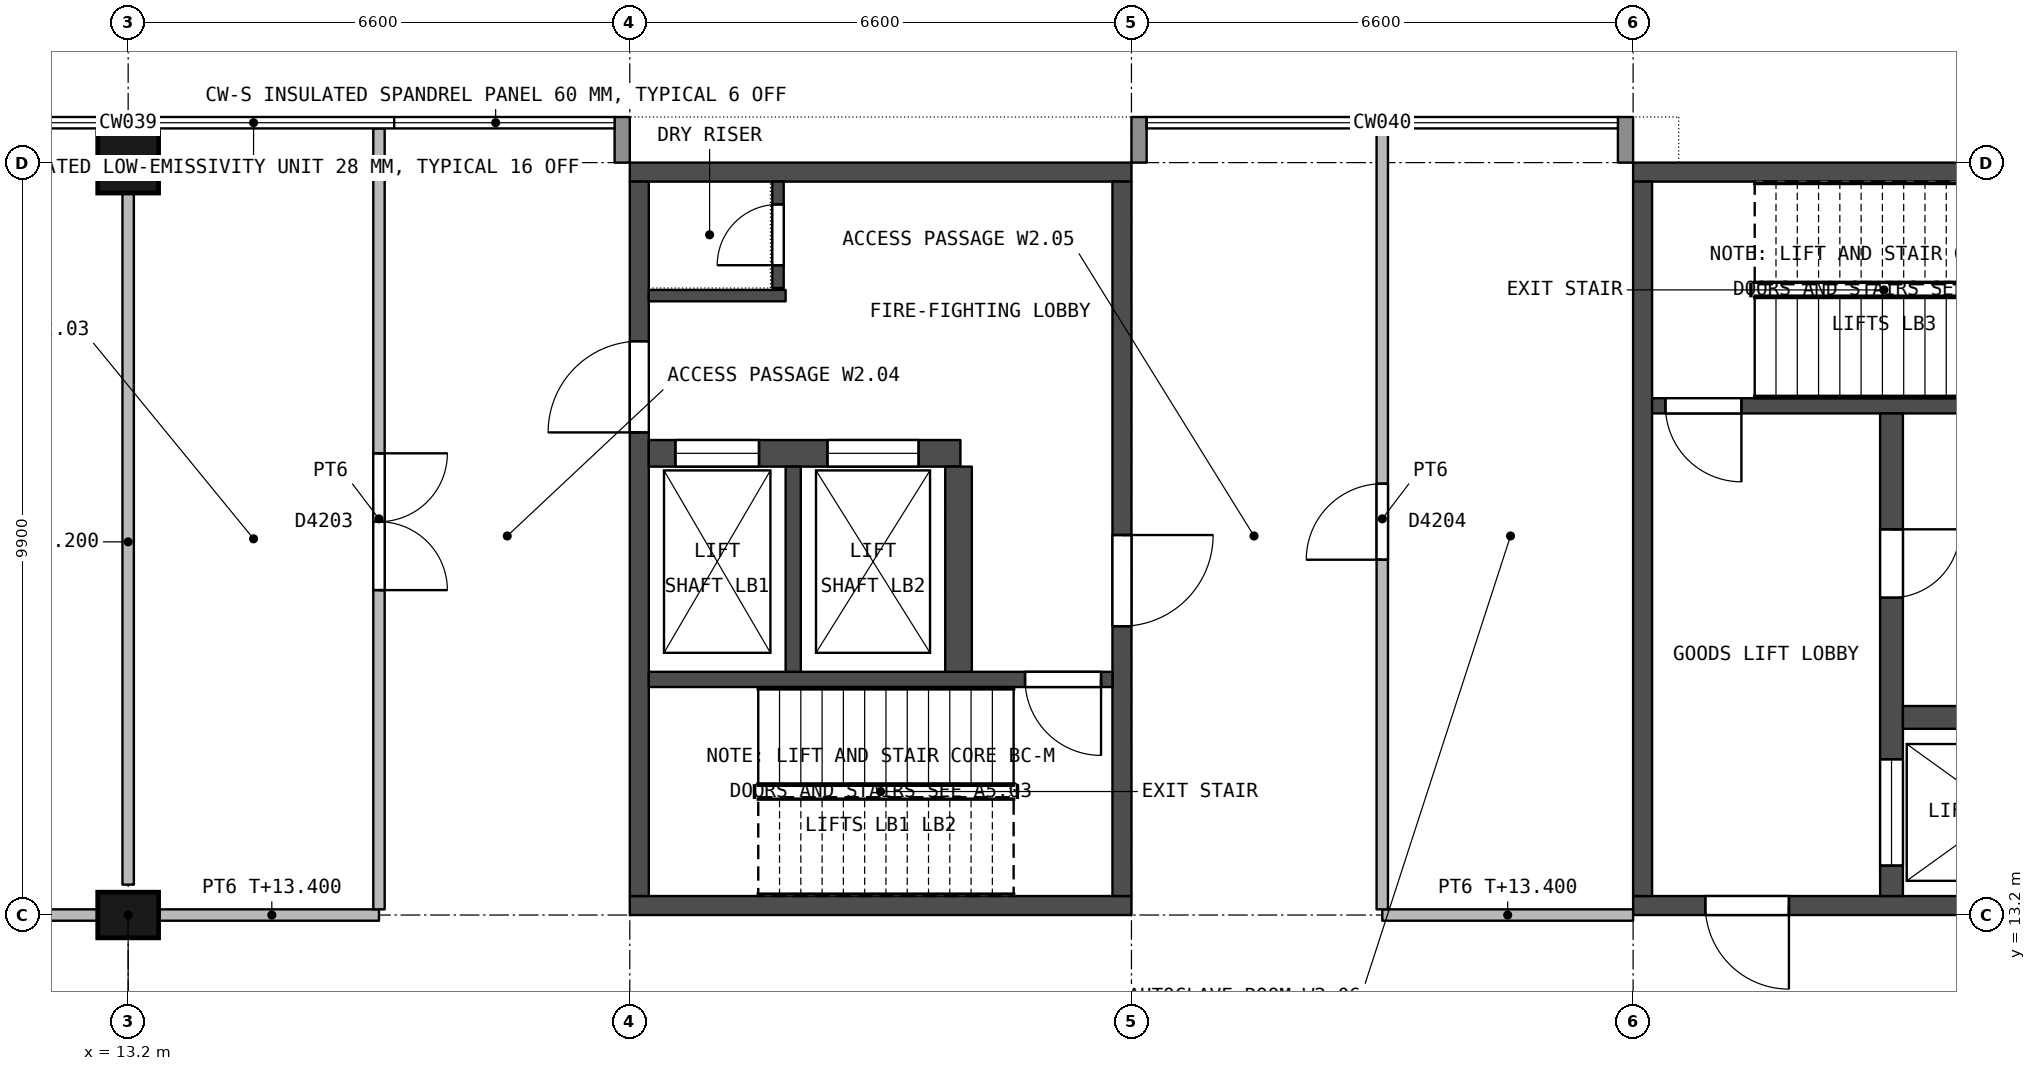
"""IFC4 building model, lengths in metres.
Left out: names, types, materials, properties, quantities, classifications, styles, units other than length and angle.
Written with IfcOpenShell. Run it as: python <this file> out.ifc"""

import sys

from ifc_helpers import new_model, si_unit, direction, frame, frame_2d, origin, origin_2d, place, context, subcontext, project, spatial, rectangle, extrude, element, fill, save


model = new_model("IFC4")
c1 = context("Model", 3, precision=1e-05, world=origin(), true_north=direction((0.0, 1.0)))
c2 = subcontext(c1, "Body", "Model", "MODEL_VIEW")
j1 = project(units=[si_unit("LENGTHUNIT", "METRE"), si_unit("PLANEANGLEUNIT", "RADIAN")], contexts=[c1])
p1 = place(None, origin())
s1 = spatial("IfcSite", under=j1, at=p1, CompositionType="ELEMENT")
p2 = place(p1, origin())
s2 = spatial("IfcBuilding", under=s1, at=p2, CompositionType="ELEMENT")
p3 = place(p2, frame((0.0, 0.0, 9.9)))
s3 = spatial("IfcBuildingStorey", under=s2, at=p3, CompositionType="ELEMENT", Elevation=9.9)
p4 = place(p3, frame((13.2, 13.2, 0.0), z_axis=(0.0, 0.0, 1.0), x_axis=(1.0, 0.0, 0.0)))
e1 = element("IfcColumn", 1, at=p4, inside=s3, PredefinedType="COLUMN", context=c2, shape_type="SweptSolid", body=[
    extrude(rectangle(XDim=0.8, YDim=0.6, at=origin_2d()), origin(), (0.0, 0.0, 1.0), 4.5),
])
p5 = place(p3, frame((13.2, 23.1, 0.0), z_axis=(0.0, 0.0, 1.0), x_axis=(1.0, 0.0, 0.0)))
e2 = element("IfcColumn", 2, at=p5, inside=s3, PredefinedType="COLUMN", context=c2, shape_type="SweptSolid", body=[
    extrude(rectangle(XDim=0.8, YDim=0.8, at=origin_2d()), origin(), (0.0, 0.0, 1.0), 4.5),
])
for number, where, z_axis, x_axis in (
    (3, (19.8, 13.325, 0.0), (0.0, 0.0, 1.0), (1.0, 0.0, 0.0)),
    (4, (19.8, 22.975, 0.0), (0.0, 0.0, 1.0), (1.0, 0.0, 0.0)),
):
    element("IfcWall", number, at=place(p3, frame(where, z_axis=z_axis, x_axis=x_axis)), inside=s3, PredefinedType="SHEAR", context=c2, shape_type="SweptSolid", body=[
        extrude(rectangle(XDim=6.6, YDim=0.25, at=frame_2d((3.3, 0.0))), origin(), (0.0, 0.0, 1.0), 4.2),
    ])
p6 = place(p3, frame((19.925, 13.45, 0.0), z_axis=(0.0, 0.0, 1.0), x_axis=(0.0, 1.0, 0.0)))
e5 = element("IfcWall", 5, at=p6, inside=s3, PredefinedType="SHEAR", context=c2, shape_type="SweptSolid", body=[
    extrude(rectangle(XDim=9.4, YDim=0.25, at=frame_2d((4.7, 0.0))), origin(), (0.0, 0.0, 1.0), 4.2),
])
p7 = place(p6, frame((6.1, 0.0, 0.0)))
e6 = element("IfcOpeningElement", 6, at=p7, cuts=e5, PredefinedType="OPENING", context=c2, shape_type="SweptSolid", body=[
    extrude(rectangle(XDim=1.2, YDim=2.1, at=frame_2d((0.6, 1.05))), frame((0.0, 0.135, 0.0), z_axis=(0.0, -1.0, 0.0), x_axis=(1.0, 0.0, 0.0)), (0.0, 0.0, 1.0), 0.27),
])
p8 = place(p3, frame((26.275, 13.45, 0.0), z_axis=(0.0, 0.0, 1.0), x_axis=(0.0, 1.0, 0.0)))
e7 = element("IfcWall", 7, at=p8, inside=s3, PredefinedType="SHEAR", context=c2, shape_type="SweptSolid", body=[
    extrude(rectangle(XDim=9.4, YDim=0.25, at=frame_2d((4.7, 0.0))), origin(), (0.0, 0.0, 1.0), 4.2),
])
p9 = place(p8, frame((3.55, 0.0, 0.0)))
e8 = element("IfcOpeningElement", 8, at=p9, cuts=e7, PredefinedType="OPENING", context=c2, shape_type="SweptSolid", body=[
    extrude(rectangle(XDim=1.2, YDim=2.1, at=frame_2d((0.6, 1.05))), frame((0.0, 0.135, 0.0), z_axis=(0.0, -1.0, 0.0), x_axis=(1.0, 0.0, 0.0)), (0.0, 0.0, 1.0), 0.27),
])
p10 = place(p3, frame((20.05, 16.3, 0.0), z_axis=(0.0, 0.0, 1.0), x_axis=(1.0, 0.0, 0.0)))
e9 = element("IfcWall", 9, at=p10, inside=s3, PredefinedType="SHEAR", context=c2, shape_type="SweptSolid", body=[
    extrude(rectangle(XDim=6.1, YDim=0.2, at=frame_2d((3.05, 0.0))), origin(), (0.0, 0.0, 1.0), 4.2),
])
p11 = place(p10, frame((4.95, 0.0, 0.0)))
e10 = element("IfcOpeningElement", 10, at=p11, cuts=e9, PredefinedType="OPENING", context=c2, shape_type="SweptSolid", body=[
    extrude(rectangle(XDim=1.0, YDim=2.2, at=frame_2d((0.5, 1.1))), frame((0.0, 0.11, 0.0), z_axis=(0.0, -1.0, 0.0), x_axis=(1.0, 0.0, 0.0)), (0.0, 0.0, 1.0), 0.22),
])
p12 = place(p3, frame((20.05, 19.275, 0.0), z_axis=(0.0, 0.0, 1.0), x_axis=(1.0, 0.0, 0.0)))
e11 = element("IfcWall", 11, at=p12, inside=s3, PredefinedType="SHEAR", context=c2, shape_type="SweptSolid", body=[
    extrude(rectangle(XDim=4.1, YDim=0.35, at=frame_2d((2.05, 0.0))), origin(), (0.0, 0.0, 1.0), 4.2),
])
p13 = place(p12, frame((0.35, 0.0, 0.0)))
e12 = element("IfcOpeningElement", 12, at=p13, cuts=e11, PredefinedType="OPENING", context=c2, shape_type="SweptSolid", body=[
    extrude(rectangle(XDim=1.1, YDim=2.2, at=frame_2d((0.55, 1.1))), frame((0.0, 0.185, 0.0), z_axis=(0.0, -1.0, 0.0), x_axis=(1.0, 0.0, 0.0)), (0.0, 0.0, 1.0), 0.37),
])
p14 = place(p12, frame((2.35, 0.0, 0.0)))
e13 = element("IfcOpeningElement", 13, at=p14, cuts=e11, PredefinedType="OPENING", context=c2, shape_type="SweptSolid", body=[
    extrude(rectangle(XDim=1.2, YDim=2.3, at=frame_2d((0.6, 1.15))), frame((0.0, 0.185, 0.0), z_axis=(0.0, -1.0, 0.0), x_axis=(1.0, 0.0, 0.0)), (0.0, 0.0, 1.0), 0.37),
])
p15 = place(p3, frame((21.95, 16.4, 0.0), z_axis=(0.0, 0.0, 1.0), x_axis=(0.0, 1.0, 0.0)))
e14 = element("IfcWall", 14, at=p15, inside=s3, PredefinedType="SHEAR", context=c2, shape_type="SweptSolid", body=[
    extrude(rectangle(XDim=2.7, YDim=0.2, at=frame_2d((1.35, 0.0))), origin(), (0.0, 0.0, 1.0), 4.2),
])
p16 = place(p3, frame((24.125, 16.4, 0.0), z_axis=(0.0, 0.0, 1.0), x_axis=(0.0, 1.0, 0.0)))
e15 = element("IfcWall", 15, at=p16, inside=s3, PredefinedType="SHEAR", context=c2, shape_type="SweptSolid", body=[
    extrude(rectangle(XDim=2.7, YDim=0.35, at=frame_2d((1.35, 0.0))), origin(), (0.0, 0.0, 1.0), 4.2),
])
p17 = place(p3, frame((20.05, 21.35, 0.0), z_axis=(0.0, 0.0, 1.0), x_axis=(1.0, 0.0, 0.0)))
e16 = element("IfcWall", 16, at=p17, inside=s3, PredefinedType="SHEAR", context=c2, shape_type="SweptSolid", body=[
    extrude(rectangle(XDim=1.8, YDim=0.15, at=frame_2d((0.9, 0.0))), origin(), (0.0, 0.0, 1.0), 4.2),
])
p18 = place(p3, frame((21.75, 21.45, 0.0), z_axis=(0.0, 0.0, 1.0), x_axis=(0.0, 1.0, 0.0)))
e17 = element("IfcWall", 17, at=p18, inside=s3, PredefinedType="SHEAR", context=c2, shape_type="SweptSolid", body=[
    extrude(rectangle(XDim=1.4, YDim=0.15, at=frame_2d((0.7, 0.0))), origin(), (0.0, 0.0, 1.0), 4.2),
])
p19 = place(p18, frame((0.3, 0.0, 0.0)))
e18 = element("IfcOpeningElement", 18, at=p19, cuts=e17, PredefinedType="OPENING", context=c2, shape_type="SweptSolid", body=[
    extrude(rectangle(XDim=0.8, YDim=2.0, at=frame_2d((0.4, 1.0))), frame((0.0, 0.085, 0.0), z_axis=(0.0, -1.0, 0.0), x_axis=(1.0, 0.0, 0.0)), (0.0, 0.0, 1.0), 0.17),
])
p20 = place(p3, frame((33.0, 13.325, 0.0), z_axis=(0.0, 0.0, 1.0), x_axis=(1.0, 0.0, 0.0)))
e19 = element("IfcWall", 19, at=p20, inside=s3, PredefinedType="SHEAR", context=c2, shape_type="SweptSolid", body=[
    extrude(rectangle(XDim=6.6, YDim=0.25, at=frame_2d((3.3, 0.0))), origin(), (0.0, 0.0, 1.0), 4.2),
])
p21 = place(p20, frame((0.95, 0.0, 0.0)))
e20 = element("IfcOpeningElement", 20, at=p21, cuts=e19, PredefinedType="OPENING", context=c2, shape_type="SweptSolid", body=[
    extrude(rectangle(XDim=1.1, YDim=2.1, at=frame_2d((0.55, 1.05))), frame((0.0, 0.135, 0.0), z_axis=(0.0, -1.0, 0.0), x_axis=(1.0, 0.0, 0.0)), (0.0, 0.0, 1.0), 0.27),
])
p22 = place(p3, frame((33.0, 22.975, 0.0), z_axis=(0.0, 0.0, 1.0), x_axis=(1.0, 0.0, 0.0)))
e21 = element("IfcWall", 21, at=p22, inside=s3, PredefinedType="SHEAR", context=c2, shape_type="SweptSolid", body=[
    extrude(rectangle(XDim=6.6, YDim=0.25, at=frame_2d((3.3, 0.0))), origin(), (0.0, 0.0, 1.0), 4.2),
])
p23 = place(p3, frame((33.125, 13.45, 0.0), z_axis=(0.0, 0.0, 1.0), x_axis=(0.0, 1.0, 0.0)))
e22 = element("IfcWall", 22, at=p23, inside=s3, PredefinedType="SHEAR", context=c2, shape_type="SweptSolid", body=[
    extrude(rectangle(XDim=9.4, YDim=0.25, at=frame_2d((4.7, 0.0))), origin(), (0.0, 0.0, 1.0), 4.2),
])
p24 = place(p3, frame((33.25, 19.9, 0.0), z_axis=(0.0, 0.0, 1.0), x_axis=(1.0, 0.0, 0.0)))
e23 = element("IfcWall", 23, at=p24, inside=s3, PredefinedType="SHEAR", context=c2, shape_type="SweptSolid", body=[
    extrude(rectangle(XDim=6.1, YDim=0.2, at=frame_2d((3.05, 0.0))), origin(), (0.0, 0.0, 1.0), 4.2),
])
p25 = place(p24, frame((0.175, 0.0, 0.0)))
e24 = element("IfcOpeningElement", 24, at=p25, cuts=e23, PredefinedType="OPENING", context=c2, shape_type="SweptSolid", body=[
    extrude(rectangle(XDim=1.0, YDim=2.1, at=frame_2d((0.5, 1.05))), frame((0.0, 0.11, 0.0), z_axis=(0.0, -1.0, 0.0), x_axis=(1.0, 0.0, 0.0)), (0.0, 0.0, 1.0), 0.22),
])
p26 = place(p3, frame((36.4, 13.45, 0.0), z_axis=(0.0, 0.0, 1.0), x_axis=(0.0, 1.0, 0.0)))
e25 = element("IfcWall", 25, at=p26, inside=s3, PredefinedType="SHEAR", context=c2, shape_type="SweptSolid", body=[
    extrude(rectangle(XDim=6.35, YDim=0.3, at=frame_2d((3.175, 0.0))), origin(), (0.0, 0.0, 1.0), 4.2),
])
p27 = place(p26, frame((3.925, 0.0, 0.0)))
e26 = element("IfcOpeningElement", 26, at=p27, cuts=e25, PredefinedType="OPENING", context=c2, shape_type="SweptSolid", body=[
    extrude(rectangle(XDim=0.9, YDim=2.1, at=frame_2d((0.45, 1.05))), frame((0.0, 0.16, 0.0), z_axis=(0.0, -1.0, 0.0), x_axis=(1.0, 0.0, 0.0)), (0.0, 0.0, 1.0), 0.32),
])
p28 = place(p26, frame((0.4, 0.0, 0.0)))
e27 = element("IfcOpeningElement", 27, at=p28, cuts=e25, PredefinedType="OPENING", context=c2, shape_type="SweptSolid", body=[
    extrude(rectangle(XDim=1.4, YDim=2.4, at=frame_2d((0.7, 1.2))), frame((0.0, 0.16, 0.0), z_axis=(0.0, -1.0, 0.0), x_axis=(1.0, 0.0, 0.0)), (0.0, 0.0, 1.0), 0.32),
])
p29 = place(p3, frame((36.55, 15.8, 0.0), z_axis=(0.0, 0.0, 1.0), x_axis=(1.0, 0.0, 0.0)))
e28 = element("IfcWall", 28, at=p29, inside=s3, PredefinedType="SHEAR", context=c2, shape_type="SweptSolid", body=[
    extrude(rectangle(XDim=2.8, YDim=0.3, at=frame_2d((1.4, 0.0))), origin(), (0.0, 0.0, 1.0), 4.2),
])
for number, where, z_axis, x_axis in (
    (29, (19.7, 23.1, 0.0), (0.0, 0.0, 1.0), (0.0, 1.0, 0.0)),
    (30, (26.5, 23.1, 0.0), (0.0, 0.0, 1.0), (0.0, 1.0, 0.0)),
    (31, (32.9, 23.1, 0.0), (0.0, 0.0, 1.0), (0.0, 1.0, 0.0)),
):
    element("IfcWall", number, at=place(p3, frame(where, z_axis=z_axis, x_axis=x_axis)), inside=s3, PredefinedType="STANDARD", context=c2, shape_type="SweptSolid", body=[
        extrude(rectangle(XDim=0.6, YDim=0.2, at=frame_2d((0.3, 0.0))), origin(), (0.0, 0.0, 1.0), 3.5),
    ])
p30 = place(p3, frame((12.8, 13.2, 0.0), z_axis=(0.0, 0.0, 1.0), x_axis=(-1.0, 0.0, 0.0)))
e32 = element("IfcWall", 32, at=p30, inside=s3, PredefinedType="PARTITIONING", context=c2, shape_type="SweptSolid", body=[
    extrude(rectangle(XDim=6.2, YDim=0.15, at=frame_2d((3.1, 0.0))), origin(), (0.0, 0.0, 1.0), 3.5),
])
p31 = place(p30, frame((2.15, 0.0, 0.0)))
e33 = element("IfcOpeningElement", 33, at=p31, cuts=e32, PredefinedType="OPENING", context=c2, shape_type="SweptSolid", body=[
    extrude(rectangle(XDim=1.5, YDim=2.1, at=frame_2d((0.75, 1.05))), frame((0.0, 0.085, 0.0), z_axis=(0.0, -1.0, 0.0), x_axis=(1.0, 0.0, 0.0)), (0.0, 0.0, 1.0), 0.17),
])
p32 = place(p3, frame((16.5, 13.2, 0.0), z_axis=(0.0, 0.0, 1.0), x_axis=(-1.0, 0.0, 0.0)))
e34 = element("IfcWall", 34, at=p32, inside=s3, PredefinedType="PARTITIONING", context=c2, shape_type="SweptSolid", body=[
    extrude(rectangle(XDim=2.9, YDim=0.15, at=frame_2d((1.45, 0.0))), origin(), (0.0, 0.0, 1.0), 3.5),
])
p33 = place(p3, frame((33.0, 13.2, 0.0), z_axis=(0.0, 0.0, 1.0), x_axis=(-1.0, 0.0, 0.0)))
e35 = element("IfcWall", 35, at=p33, inside=s3, PredefinedType="PARTITIONING", context=c2, shape_type="SweptSolid", body=[
    extrude(rectangle(XDim=3.3, YDim=0.15, at=frame_2d((1.65, 0.0))), origin(), (0.0, 0.0, 1.0), 3.5),
])
p34 = place(p3, frame((13.2, 13.6, 0.0), z_axis=(0.0, 0.0, 1.0), x_axis=(0.0, 1.0, 0.0)))
e36 = element("IfcWall", 36, at=p34, inside=s3, PredefinedType="PARTITIONING", context=c2, shape_type="SweptSolid", body=[
    extrude(rectangle(XDim=9.1, YDim=0.15, at=frame_2d((4.55, 0.0))), origin(), (0.0, 0.0, 1.0), 3.3),
])
p35 = place(p3, frame((16.5, 23.55, 0.0), z_axis=(0.0, 0.0, 1.0), x_axis=(0.0, -1.0, 0.0)))
e37 = element("IfcWall", 37, at=p35, inside=s3, PredefinedType="PARTITIONING", context=c2, shape_type="SweptSolid", body=[
    extrude(rectangle(XDim=10.275, YDim=0.15, at=frame_2d((5.138, 0.0))), origin(), (0.0, 0.0, 1.0), 4.2),
])
p36 = place(p35, frame((4.275, 0.0, 0.0)))
e38 = element("IfcOpeningElement", 38, at=p36, cuts=e37, PredefinedType="OPENING", context=c2, shape_type="SweptSolid", body=[
    extrude(rectangle(XDim=1.8, YDim=2.4, at=frame_2d((0.9, 1.2))), frame((0.0, 0.085, 0.0), z_axis=(0.0, -1.0, 0.0), x_axis=(1.0, 0.0, 0.0)), (0.0, 0.0, 1.0), 0.17),
])
p37 = place(p3, frame((29.7, 13.275, 0.0), z_axis=(0.0, 0.0, 1.0), x_axis=(0.0, 1.0, 0.0)))
e39 = element("IfcWall", 39, at=p37, inside=s3, PredefinedType="PARTITIONING", context=c2, shape_type="SweptSolid", body=[
    extrude(rectangle(XDim=10.275, YDim=0.15, at=frame_2d((5.138, 0.0))), origin(), (0.0, 0.0, 1.0), 4.2),
])
p38 = place(p37, frame((4.6, 0.0, 0.0)))
e40 = element("IfcOpeningElement", 40, at=p38, cuts=e39, PredefinedType="OPENING", context=c2, shape_type="SweptSolid", body=[
    extrude(rectangle(XDim=1.0, YDim=2.1, at=frame_2d((0.5, 1.05))), frame((0.0, 0.085, 0.0), z_axis=(0.0, -1.0, 0.0), x_axis=(1.0, 0.0, 0.0)), (0.0, 0.0, 1.0), 0.17),
])
p39 = place(p9, origin())
e41 = element("IfcDoor", 41, at=p39, inside=s3, OperationType="SINGLE_SWING_RIGHT", PredefinedType="DOOR", context=c2, shape_type="SweptSolid", body=[
    extrude(rectangle(XDim=1.2, YDim=2.1, at=frame_2d((0.6, 1.05))), frame((0.0, 0.025, 0.0), z_axis=(0.0, -1.0, 0.0), x_axis=(1.0, 0.0, 0.0)), (0.0, 0.0, 1.0), 0.05),
])
fill(e8, e41)
p40 = place(p7, origin())
e42 = element("IfcDoor", 42, at=p40, inside=s3, OperationType="SINGLE_SWING_LEFT", PredefinedType="DOOR", context=c2, shape_type="SweptSolid", body=[
    extrude(rectangle(XDim=1.2, YDim=2.1, at=frame_2d((0.6, 1.05))), frame((0.0, 0.025, 0.0), z_axis=(0.0, -1.0, 0.0), x_axis=(1.0, 0.0, 0.0)), (0.0, 0.0, 1.0), 0.05),
])
fill(e6, e42)
p41 = place(p11, origin())
e43 = element("IfcDoor", 43, at=p41, inside=s3, OperationType="SINGLE_SWING_RIGHT", PredefinedType="DOOR", context=c2, shape_type="SweptSolid", body=[
    extrude(rectangle(XDim=1.0, YDim=2.2, at=frame_2d((0.5, 1.1))), frame((0.0, 0.025, 0.0), z_axis=(0.0, -1.0, 0.0), x_axis=(1.0, 0.0, 0.0)), (0.0, 0.0, 1.0), 0.05),
])
fill(e10, e43)
p42 = place(p19, origin())
e44 = element("IfcDoor", 44, at=p42, inside=s3, OperationType="SINGLE_SWING_LEFT", PredefinedType="DOOR", context=c2, shape_type="SweptSolid", body=[
    extrude(rectangle(XDim=0.8, YDim=2.0, at=frame_2d((0.4, 1.0))), frame((0.0, 0.025, 0.0), z_axis=(0.0, -1.0, 0.0), x_axis=(1.0, 0.0, 0.0)), (0.0, 0.0, 1.0), 0.05),
])
fill(e18, e44)
p43 = place(p13, origin())
e45 = element("IfcDoor", 45, at=p43, inside=s3, OperationType="DOUBLE_DOOR_SLIDING", PredefinedType="NOTDEFINED", context=c2, shape_type="SweptSolid", body=[
    extrude(rectangle(XDim=1.1, YDim=2.2, at=frame_2d((0.55, 1.1))), frame((0.0, 0.025, 0.0), z_axis=(0.0, -1.0, 0.0), x_axis=(1.0, 0.0, 0.0)), (0.0, 0.0, 1.0), 0.05),
])
fill(e12, e45)
p44 = place(p14, origin())
e46 = element("IfcDoor", 46, at=p44, inside=s3, OperationType="DOUBLE_DOOR_SLIDING", PredefinedType="NOTDEFINED", context=c2, shape_type="SweptSolid", body=[
    extrude(rectangle(XDim=1.2, YDim=2.3, at=frame_2d((0.6, 1.15))), frame((0.0, 0.025, 0.0), z_axis=(0.0, -1.0, 0.0), x_axis=(1.0, 0.0, 0.0)), (0.0, 0.0, 1.0), 0.05),
])
fill(e13, e46)
p45 = place(p27, origin())
e47 = element("IfcDoor", 47, at=p45, inside=s3, OperationType="SINGLE_SWING_RIGHT", PredefinedType="DOOR", context=c2, shape_type="SweptSolid", body=[
    extrude(rectangle(XDim=0.9, YDim=2.1, at=frame_2d((0.45, 1.05))), frame((0.0, 0.025, 0.0), z_axis=(0.0, -1.0, 0.0), x_axis=(1.0, 0.0, 0.0)), (0.0, 0.0, 1.0), 0.05),
])
fill(e26, e47)
p46 = place(p21, origin())
e48 = element("IfcDoor", 48, at=p46, inside=s3, OperationType="SINGLE_SWING_RIGHT", PredefinedType="DOOR", context=c2, shape_type="SweptSolid", body=[
    extrude(rectangle(XDim=1.1, YDim=2.1, at=frame_2d((0.55, 1.05))), frame((0.0, 0.025, 0.0), z_axis=(0.0, -1.0, 0.0), x_axis=(1.0, 0.0, 0.0)), (0.0, 0.0, 1.0), 0.05),
])
fill(e20, e48)
p47 = place(p25, origin())
e49 = element("IfcDoor", 49, at=p47, inside=s3, OperationType="SINGLE_SWING_RIGHT", PredefinedType="DOOR", context=c2, shape_type="SweptSolid", body=[
    extrude(rectangle(XDim=1.0, YDim=2.1, at=frame_2d((0.5, 1.05))), frame((0.0, 0.025, 0.0), z_axis=(0.0, -1.0, 0.0), x_axis=(1.0, 0.0, 0.0)), (0.0, 0.0, 1.0), 0.05),
])
fill(e24, e49)
p48 = place(p28, origin())
e50 = element("IfcDoor", 50, at=p48, inside=s3, OperationType="DOUBLE_DOOR_SLIDING", PredefinedType="NOTDEFINED", context=c2, shape_type="SweptSolid", body=[
    extrude(rectangle(XDim=1.4, YDim=2.4, at=frame_2d((0.7, 1.2))), frame((0.0, 0.025, 0.0), z_axis=(0.0, -1.0, 0.0), x_axis=(1.0, 0.0, 0.0)), (0.0, 0.0, 1.0), 0.05),
])
fill(e27, e50)
p49 = place(p36, origin())
e51 = element("IfcDoor", 51, at=p49, inside=s3, OperationType="DOUBLE_DOOR_SINGLE_SWING", PredefinedType="DOOR", context=c2, shape_type="SweptSolid", body=[
    extrude(rectangle(XDim=1.8, YDim=2.4, at=frame_2d((0.9, 1.2))), frame((0.0, 0.027, 0.0), z_axis=(0.0, -1.0, 0.0), x_axis=(1.0, 0.0, 0.0)), (0.0, 0.0, 1.0), 0.054),
])
fill(e38, e51)
p50 = place(p38, origin())
e52 = element("IfcDoor", 52, at=p50, inside=s3, OperationType="SINGLE_SWING_LEFT", PredefinedType="DOOR", context=c2, shape_type="SweptSolid", body=[
    extrude(rectangle(XDim=1.0, YDim=2.1, at=frame_2d((0.5, 1.05))), frame((0.0, 0.027, 0.0), z_axis=(0.0, -1.0, 0.0), x_axis=(1.0, 0.0, 0.0)), (0.0, 0.0, 1.0), 0.054),
])
fill(e40, e52)
save(model, sys.argv[1])
